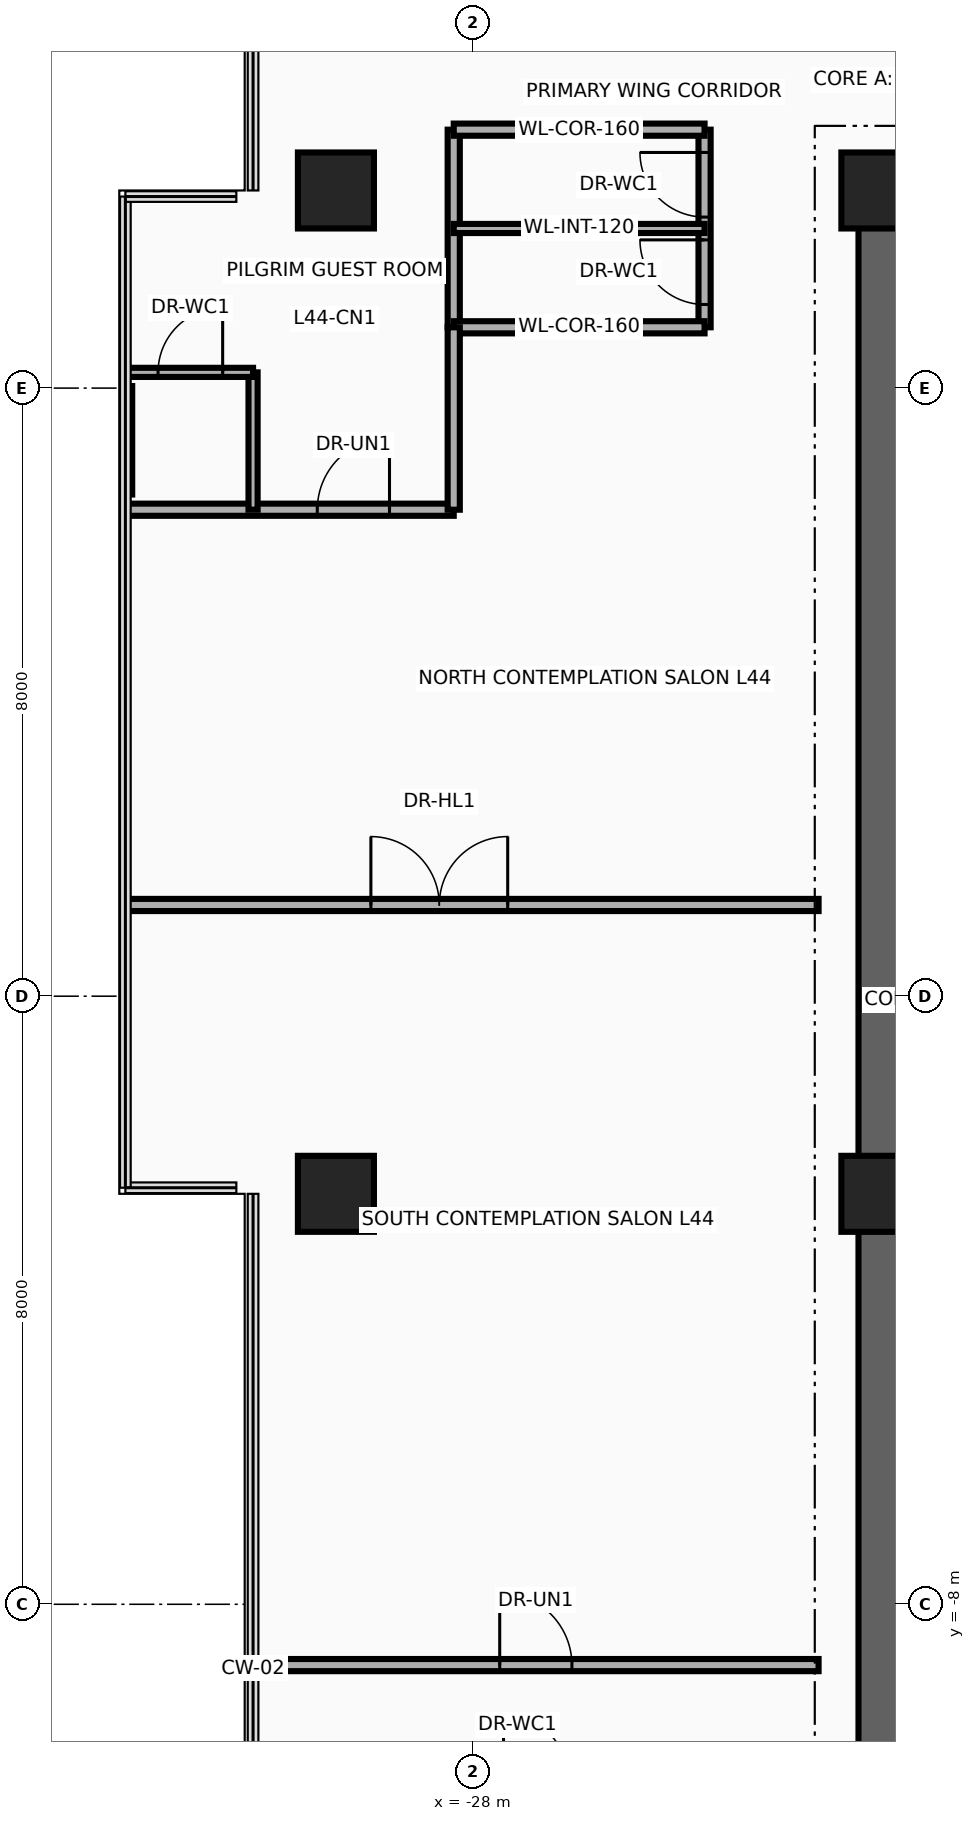
"""IFC4 building model, lengths in metres.
Left out: names, types, materials, properties, quantities, classifications, styles, units other than length and angle.
Written with IfcOpenShell. Run it as: python <this file> out.ifc"""

import sys

from ifc_helpers import new_model, si_unit, direction, frame, frame_2d, origin, origin_2d, place, context, subcontext, project, spatial, rectangle, extrude, source, transform, mapped, element, fill, save


model = new_model("IFC4")
c1 = context("Model", 3, precision=1e-05, world=origin(), true_north=direction((0.0, 1.0)))
c2 = subcontext(c1, "Body", "Model", "MODEL_VIEW")
j1 = project(units=[si_unit("LENGTHUNIT", "METRE"), si_unit("PLANEANGLEUNIT", "RADIAN")], contexts=[c1])
p1 = place(None, origin())
s1 = spatial("IfcSite", under=j1, at=p1, CompositionType="ELEMENT")
p2 = place(p1, origin())
s2 = spatial("IfcBuilding", under=s1, at=p2, CompositionType="ELEMENT")
p3 = place(p2, frame((0.0, 0.0, 172.3)))
s3 = spatial("IfcBuildingStorey", under=s2, at=p3, CompositionType="ELEMENT", Elevation=172.3)
p4 = place(p3, frame((-22.65, -11.075, 0.0), z_axis=(0.0, 0.0, 1.0), x_axis=(0.0, 1.0, 0.0)))
e1 = element("IfcWall", 1, at=p4, inside=s3, PredefinedType="SHEAR", context=c2, shape_type="SweptSolid", body=[
    extrude(rectangle(XDim=22.15, YDim=0.55, at=frame_2d((11.075, 0.0))), origin(), (0.0, 0.0, 1.0), 3.93),
])
p5 = place(p3, frame((-22.65, 10.8, 0.0), z_axis=(0.0, 0.0, 1.0), x_axis=(1.0, 0.0, 0.0)))
e2 = element("IfcWall", 2, at=p5, inside=s3, PredefinedType="SHEAR", context=c2, shape_type="SweptSolid", body=[
    extrude(rectangle(XDim=10.25, YDim=0.55, at=frame_2d((5.125, 0.0))), origin(), (0.0, 0.0, 1.0), 3.93),
])
m1 = source(origin(), c2, "Body", "SweptSolid", [
    extrude(rectangle(XDim=1.0, YDim=1.0, at=origin_2d()), origin(), (0.0, 0.0, 1.0), 4.25),
])
for number, where, z_axis, x_axis in (
    (3, (-29.8, -2.6, 0.0), (0.0, 0.0, 1.0), (1.0, 0.0, 0.0)),
    (4, (-22.65, -2.6, 0.0), (0.0, 0.0, 1.0), (1.0, 0.0, 0.0)),
    (5, (-29.8, 10.6, 0.0), (0.0, 0.0, 1.0), (1.0, 0.0, 0.0)),
    (6, (-22.65, 10.6, 0.0), (0.0, 0.0, 1.0), (1.0, 0.0, 0.0)),
):
    element("IfcColumn", number, at=place(p3, frame(where, z_axis=z_axis, x_axis=x_axis)), inside=s3, PredefinedType="COLUMN", context=c2, shape_type="MappedRepresentation", body=[
        mapped(m1, transform((0.0, 0.0, 0.0), x_axis=(1.0, 0.0, 0.0), y_axis=(0.0, 1.0, 0.0), z_axis=(0.0, 0.0, 1.0), scale=1.0)),
    ])
p6 = place(p3, frame((-28.25, 8.8, 0.0), z_axis=(0.0, 0.0, 1.0), x_axis=(0.0, 1.0, 0.0)))
e7 = element("IfcWall", 7, at=p6, inside=s3, PredefinedType="PARTITIONING", context=c2, shape_type="SweptSolid", body=[
    extrude(rectangle(XDim=2.6, YDim=0.16, at=frame_2d((1.3, 0.0))), origin(), (0.0, 0.0, 1.0), 2.965),
])
p7 = place(p3, frame((-24.95, 8.8, 0.0), z_axis=(0.0, 0.0, 1.0), x_axis=(0.0, 1.0, 0.0)))
e8 = element("IfcWall", 8, at=p7, inside=s3, PredefinedType="PARTITIONING", context=c2, shape_type="SweptSolid", body=[
    extrude(rectangle(XDim=2.6, YDim=0.16, at=frame_2d((1.3, 0.0))), origin(), (0.0, 0.0, 1.0), 2.965),
])
p8 = place(p7, frame((0.3, 0.0, 0.0)))
e9 = element("IfcOpeningElement", 9, at=p8, cuts=e8, PredefinedType="OPENING", context=c2, shape_type="SweptSolid", body=[
    extrude(rectangle(XDim=0.85, YDim=2.1, at=frame_2d((0.425, 1.05))), frame((0.0, 0.095, 0.0), z_axis=(0.0, -1.0, 0.0), x_axis=(1.0, 0.0, 0.0)), (0.0, 0.0, 1.0), 0.19),
])
p9 = place(p7, frame((1.45, 0.0, 0.0)))
e10 = element("IfcOpeningElement", 10, at=p9, cuts=e8, PredefinedType="OPENING", context=c2, shape_type="SweptSolid", body=[
    extrude(rectangle(XDim=0.85, YDim=2.1, at=frame_2d((0.425, 1.05))), frame((0.0, 0.095, 0.0), z_axis=(0.0, -1.0, 0.0), x_axis=(1.0, 0.0, 0.0)), (0.0, 0.0, 1.0), 0.19),
])
for number, where, z_axis, x_axis in (
    (11, (-28.25, 8.8, 0.0), (0.0, 0.0, 1.0), (1.0, 0.0, 0.0)),
    (12, (-28.25, 11.4, 0.0), (0.0, 0.0, 1.0), (1.0, 0.0, 0.0)),
):
    element("IfcWall", number, at=place(p3, frame(where, z_axis=z_axis, x_axis=x_axis)), inside=s3, PredefinedType="PARTITIONING", context=c2, shape_type="SweptSolid", body=[
        extrude(rectangle(XDim=3.3, YDim=0.16, at=frame_2d((1.65, 0.0))), origin(), (0.0, 0.0, 1.0), 3.93),
    ])
p10 = place(p3, frame((-28.25, 10.1, 0.0), z_axis=(0.0, 0.0, 1.0), x_axis=(1.0, 0.0, 0.0)))
e13 = element("IfcWall", 13, at=p10, inside=s3, PredefinedType="PARTITIONING", context=c2, shape_type="SweptSolid", body=[
    extrude(rectangle(XDim=3.3, YDim=0.12, at=frame_2d((1.65, 0.0))), origin(), (0.0, 0.0, 1.0), 3.93),
])
p11 = place(p3, frame((-30.89, -8.8, 0.0), z_axis=(0.0, 0.0, 1.0), x_axis=(1.0, 0.0, 0.0)))
e14 = element("IfcWall", 14, at=p11, inside=s3, PredefinedType="PARTITIONING", context=c2, shape_type="SweptSolid", body=[
    extrude(rectangle(XDim=7.44, YDim=0.16, at=frame_2d((3.72, 0.0))), origin(), (0.0, 0.0, 1.0), 3.376),
])
p12 = place(p11, frame((3.245, 0.0, 0.0)))
e15 = element("IfcOpeningElement", 15, at=p12, cuts=e14, PredefinedType="OPENING", context=c2, shape_type="SweptSolid", body=[
    extrude(rectangle(XDim=0.95, YDim=2.15, at=frame_2d((0.475, 1.075))), frame((0.0, 0.095, 0.0), z_axis=(0.0, -1.0, 0.0), x_axis=(1.0, 0.0, 0.0)), (0.0, 0.0, 1.0), 0.19),
])
p13 = place(p3, frame((-32.54, 6.4, 0.0), z_axis=(0.0, 0.0, 1.0), x_axis=(1.0, 0.0, 0.0)))
e16 = element("IfcWall", 16, at=p13, inside=s3, PredefinedType="PARTITIONING", context=c2, shape_type="SweptSolid", body=[
    extrude(rectangle(XDim=4.29, YDim=0.16, at=frame_2d((2.145, 0.0))), origin(), (0.0, 0.0, 1.0), 3.376),
])
p14 = place(p13, frame((2.495, 0.0, 0.0)))
e17 = element("IfcOpeningElement", 17, at=p14, cuts=e16, PredefinedType="OPENING", context=c2, shape_type="SweptSolid", body=[
    extrude(rectangle(XDim=0.95, YDim=2.15, at=frame_2d((0.475, 1.075))), frame((0.0, 0.095, 0.0), z_axis=(0.0, -1.0, 0.0), x_axis=(1.0, 0.0, 0.0)), (0.0, 0.0, 1.0), 0.19),
])
p15 = place(p3, frame((-28.25, 6.4, 0.0), z_axis=(0.0, 0.0, 1.0), x_axis=(0.0, 1.0, 0.0)))
e18 = element("IfcWall", 18, at=p15, inside=s3, PredefinedType="PARTITIONING", context=c2, shape_type="SweptSolid", body=[
    extrude(rectangle(XDim=2.4, YDim=0.16, at=frame_2d((1.2, 0.0))), origin(), (0.0, 0.0, 1.0), 3.458),
])
p16 = place(p3, frame((-30.89, 6.4, 0.0), z_axis=(0.0, 0.0, 1.0), x_axis=(0.0, 1.0, 0.0)))
e19 = element("IfcWall", 19, at=p16, inside=s3, PredefinedType="PARTITIONING", context=c2, shape_type="SweptSolid", body=[
    extrude(rectangle(XDim=1.807, YDim=0.12, at=frame_2d((0.904, 0.0))), origin(), (0.0, 0.0, 1.0), 3.93),
])
p17 = place(p3, frame((-32.54, 8.207, 0.0), z_axis=(0.0, 0.0, 1.0), x_axis=(1.0, 0.0, 0.0)))
e20 = element("IfcWall", 20, at=p17, inside=s3, PredefinedType="PARTITIONING", context=c2, shape_type="SweptSolid", body=[
    extrude(rectangle(XDim=1.65, YDim=0.12, at=frame_2d((0.825, 0.0))), origin(), (0.0, 0.0, 1.0), 3.93),
])
p18 = place(p17, frame((0.4, 0.0, 0.0)))
e21 = element("IfcOpeningElement", 21, at=p18, cuts=e20, PredefinedType="OPENING", context=c2, shape_type="SweptSolid", body=[
    extrude(rectangle(XDim=0.85, YDim=2.1, at=frame_2d((0.425, 1.05))), frame((0.0, 0.075, 0.0), z_axis=(0.0, -1.0, 0.0), x_axis=(1.0, 0.0, 0.0)), (0.0, 0.0, 1.0), 0.15),
])
p19 = place(p3, frame((-32.54, 6.6, 0.0), z_axis=(0.0, 0.0, 1.0), x_axis=(0.0, 1.0, 0.0)))
e22 = element("IfcWall", 22, at=p19, inside=s3, PredefinedType="PARTITIONING", context=c2, shape_type="SweptSolid", body=[
    extrude(rectangle(XDim=1.427, YDim=0.12, at=frame_2d((0.713, 0.0))), origin(), (0.0, 0.0, 1.0), 3.564),
])
p20 = place(p3, frame((-32.54, 1.2, 0.0), z_axis=(0.0, 0.0, 1.0), x_axis=(1.0, 0.0, 0.0)))
e23 = element("IfcWall", 23, at=p20, inside=s3, PredefinedType="PARTITIONING", context=c2, shape_type="SweptSolid", body=[
    extrude(rectangle(XDim=9.09, YDim=0.16, at=frame_2d((4.545, 0.0))), origin(), (0.0, 0.0, 1.0), 3.376),
])
p21 = place(p20, frame((3.2, 0.0, 0.0)))
e24 = element("IfcOpeningElement", 24, at=p21, cuts=e23, PredefinedType="OPENING", context=c2, shape_type="SweptSolid", body=[
    extrude(rectangle(XDim=1.8, YDim=2.15, at=frame_2d((0.9, 1.075))), frame((0.0, 0.095, 0.0), z_axis=(0.0, -1.0, 0.0), x_axis=(1.0, 0.0, 0.0)), (0.0, 0.0, 1.0), 0.19),
])
p22 = place(p8, origin())
e25 = element("IfcDoor", 25, at=p22, inside=s3, OperationType="SINGLE_SWING_RIGHT", PredefinedType="DOOR", context=c2, shape_type="SweptSolid", body=[
    extrude(rectangle(XDim=0.85, YDim=2.1, at=frame_2d((0.425, 1.05))), frame((0.0, 0.025, 0.0), z_axis=(0.0, -1.0, 0.0), x_axis=(1.0, 0.0, 0.0)), (0.0, 0.0, 1.0), 0.05),
])
fill(e9, e25)
p23 = place(p9, origin())
e26 = element("IfcDoor", 26, at=p23, inside=s3, OperationType="SINGLE_SWING_LEFT", PredefinedType="DOOR", context=c2, shape_type="SweptSolid", body=[
    extrude(rectangle(XDim=0.85, YDim=2.1, at=frame_2d((0.425, 1.05))), frame((0.0, 0.025, 0.0), z_axis=(0.0, -1.0, 0.0), x_axis=(1.0, 0.0, 0.0)), (0.0, 0.0, 1.0), 0.05),
])
fill(e10, e26)
p24 = place(p12, origin())
e27 = element("IfcDoor", 27, at=p24, inside=s3, OperationType="SINGLE_SWING_RIGHT", PredefinedType="DOOR", context=c2, shape_type="SweptSolid", body=[
    extrude(rectangle(XDim=0.95, YDim=2.15, at=frame_2d((0.475, 1.075))), frame((0.0, 0.025, 0.0), z_axis=(0.0, -1.0, 0.0), x_axis=(1.0, 0.0, 0.0)), (0.0, 0.0, 1.0), 0.05),
])
fill(e15, e27)
p25 = place(p14, origin())
e28 = element("IfcDoor", 28, at=p25, inside=s3, OperationType="SINGLE_SWING_RIGHT", PredefinedType="DOOR", context=c2, shape_type="SweptSolid", body=[
    extrude(rectangle(XDim=0.95, YDim=2.15, at=frame_2d((0.475, 1.075))), frame((0.0, 0.025, 0.0), z_axis=(0.0, -1.0, 0.0), x_axis=(1.0, 0.0, 0.0)), (0.0, 0.0, 1.0), 0.05),
])
fill(e17, e28)
p26 = place(p18, origin())
e29 = element("IfcDoor", 29, at=p26, inside=s3, OperationType="SINGLE_SWING_LEFT", PredefinedType="DOOR", context=c2, shape_type="SweptSolid", body=[
    extrude(rectangle(XDim=0.85, YDim=2.1, at=frame_2d((0.425, 1.05))), frame((0.0, 0.025, 0.0), z_axis=(0.0, -1.0, 0.0), x_axis=(1.0, 0.0, 0.0)), (0.0, 0.0, 1.0), 0.05),
])
fill(e21, e29)
p27 = place(p21, origin())
e30 = element("IfcDoor", 30, at=p27, inside=s3, OperationType="DOUBLE_DOOR_SINGLE_SWING", PredefinedType="DOOR", context=c2, shape_type="SweptSolid", body=[
    extrude(rectangle(XDim=1.8, YDim=2.15, at=frame_2d((0.9, 1.075))), frame((0.0, 0.025, 0.0), z_axis=(0.0, -1.0, 0.0), x_axis=(1.0, 0.0, 0.0)), (0.0, 0.0, 1.0), 0.05),
])
fill(e24, e30)
save(model, sys.argv[1])
